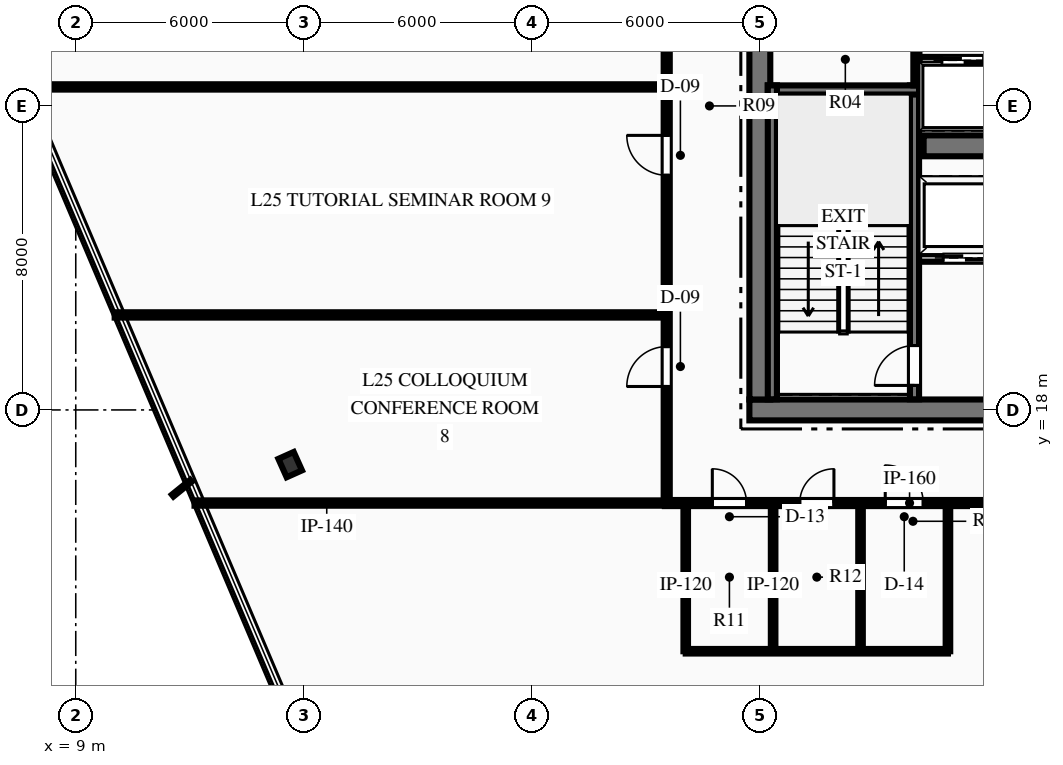
"""IFC4 building model, lengths in metres.
Left out: names, types, materials, properties, quantities, classifications, styles, units other than length and angle.
Written with IfcOpenShell. Run it as: python <this file> out.ifc"""

import sys

from ifc_helpers import new_model, si_unit, direction, frame, frame_2d, origin, origin_2d, place, context, subcontext, project, spatial, rectangle, i_section, extrude, element, fill, save


model = new_model("IFC4")
c1 = context("Model", 3, precision=1e-05, world=origin(), true_north=direction((0.0, 1.0)))
c2 = subcontext(c1, "Body", "Model", "MODEL_VIEW")
j1 = project(units=[si_unit("LENGTHUNIT", "METRE"), si_unit("PLANEANGLEUNIT", "RADIAN")], contexts=[c1])
p1 = place(None, origin())
s1 = spatial("IfcSite", under=j1, at=p1, CompositionType="ELEMENT")
p2 = place(p1, origin())
s2 = spatial("IfcBuilding", under=s1, at=p2, CompositionType="ELEMENT")
p3 = place(p2, frame((0.0, 0.0, 105.45)))
s3 = spatial("IfcBuildingStorey", under=s2, at=p3, CompositionType="ELEMENT", Elevation=105.45)
p4 = place(p3, frame((26.725, 18.0, 0.0), z_axis=(0.0, 0.0, 1.0), x_axis=(1.0, 0.0, 0.0)))
e1 = element("IfcWall", 1, at=p4, inside=s3, PredefinedType="SHEAR", context=c2, shape_type="SweptSolid", body=[
    extrude(rectangle(XDim=18.55, YDim=0.55, at=frame_2d((9.275, 0.0))), origin(), (0.0, 0.0, 1.0), 3.75),
])
p5 = place(p4, frame((7.375, 0.0, 0.0)))
e2 = element("IfcOpeningElement", 2, at=p5, cuts=e1, PredefinedType="OPENING", context=c2, shape_type="SweptSolid", body=[
    extrude(rectangle(XDim=1.1, YDim=2.15, at=frame_2d((0.55, 1.075))), frame((0.0, 0.285, 0.0), z_axis=(0.0, -1.0, 0.0), x_axis=(1.0, 0.0, 0.0)), (0.0, 0.0, 1.0), 0.57),
])
p6 = place(p4, frame((10.075, 0.0, 0.0)))
e3 = element("IfcOpeningElement", 3, at=p6, cuts=e1, PredefinedType="OPENING", context=c2, shape_type="SweptSolid", body=[
    extrude(rectangle(XDim=1.1, YDim=2.15, at=frame_2d((0.55, 1.075))), frame((0.0, 0.285, 0.0), z_axis=(0.0, -1.0, 0.0), x_axis=(1.0, 0.0, 0.0)), (0.0, 0.0, 1.0), 0.57),
])
p7 = place(p3, frame((27.0, 18.275, 0.0), z_axis=(0.0, 0.0, 1.0), x_axis=(0.0, 1.0, 0.0)))
e4 = element("IfcWall", 4, at=p7, inside=s3, PredefinedType="SHEAR", context=c2, shape_type="SweptSolid", body=[
    extrude(rectangle(XDim=15.45, YDim=0.55, at=frame_2d((7.725, 0.0))), origin(), (0.0, 0.0, 1.0), 3.75),
])
p8 = place(p7, frame((9.965, 0.0, 0.0)))
e5 = element("IfcOpeningElement", 5, at=p8, cuts=e4, PredefinedType="OPENING", context=c2, shape_type="SweptSolid", body=[
    extrude(rectangle(XDim=1.4, YDim=2.2, at=frame_2d((0.7, 1.1))), frame((0.0, 0.285, 0.0), z_axis=(0.0, -1.0, 0.0), x_axis=(1.0, 0.0, 0.0)), (0.0, 0.0, 1.0), 0.57),
])
p9 = place(p3, frame((31.31, 24.95, 0.0), z_axis=(0.0, 0.0, 1.0), x_axis=(1.0, 0.0, 0.0)))
e6 = element("IfcWall", 6, at=p9, inside=s3, PredefinedType="SHEAR", context=c2, shape_type="SweptSolid", body=[
    extrude(rectangle(XDim=9.38, YDim=0.55, at=frame_2d((4.69, 0.0))), origin(), (0.0, 0.0, 1.0), 3.75),
])
p10 = place(p3, frame((31.07, 18.28, 0.0), z_axis=(0.0, 0.0, 1.0), x_axis=(0.0, 1.0, 0.0)))
e7 = element("IfcWall", 7, at=p10, inside=s3, PredefinedType="SHEAR", context=c2, shape_type="SweptSolid", body=[
    extrude(rectangle(XDim=8.26, YDim=0.24, at=frame_2d((4.13, 0.0))), origin(), (0.0, 0.0, 1.0), 3.75),
])
p11 = place(p10, frame((0.365, 0.0, 0.0)))
e8 = element("IfcOpeningElement", 8, at=p11, cuts=e7, PredefinedType="OPENING", context=c2, shape_type="SweptSolid", body=[
    extrude(rectangle(XDim=1.05, YDim=2.15, at=frame_2d((0.525, 1.075))), frame((0.0, 0.13, 0.0), z_axis=(0.0, -1.0, 0.0), x_axis=(1.0, 0.0, 0.0)), (0.0, 0.0, 1.0), 0.26),
])
p12 = place(p3, frame((27.21, 26.42, 0.0), z_axis=(0.0, 0.0, 1.0), x_axis=(1.0, 0.0, 0.0)))
e9 = element("IfcWall", 9, at=p12, inside=s3, PredefinedType="SHEAR", context=c2, shape_type="SweptSolid", body=[
    extrude(rectangle(XDim=3.98, YDim=0.24, at=frame_2d((1.99, 0.0))), origin(), (0.0, 0.0, 1.0), 3.75),
])
p13 = place(p3, frame((27.33, 18.28, 0.0), z_axis=(0.0, 0.0, 1.0), x_axis=(0.0, 1.0, 0.0)))
e10 = element("IfcWall", 10, at=p13, inside=s3, PredefinedType="SHEAR", context=c2, shape_type="SweptSolid", body=[
    extrude(rectangle(XDim=8.26, YDim=0.24, at=frame_2d((4.13, 0.0))), origin(), (0.0, 0.0, 1.0), 3.75),
])
p14 = place(p3, frame((14.643, 16.561, 0.0), z_axis=(0.0, 0.0, 1.0), x_axis=(0.912477494148, 0.409126902895, 0.0)))
e11 = element("IfcColumn", 11, at=p14, inside=s3, PredefinedType="COLUMN", context=c2, shape_type="SweptSolid", body=[
    extrude(i_section(OverallWidth=0.442, OverallDepth=0.531, WebThickness=0.066, FlangeThickness=0.106, at=origin_2d()), origin(), (0.0, 0.0, 1.0), 3.75),
])
p15 = place(p3, frame((31.19, 22.0, 0.0), z_axis=(0.0, 0.0, 1.0), x_axis=(1.0, 0.0, 0.0)))
e12 = element("IfcWall", 12, at=p15, inside=s3, PredefinedType="PARTITIONING", context=c2, shape_type="SweptSolid", body=[
    extrude(rectangle(XDim=4.69, YDim=0.2, at=frame_2d((2.345, 0.0))), origin(), (0.0, 0.0, 1.0), 3.45),
])
p16 = place(p15, frame((2.91, 0.0, 0.0)))
e13 = element("IfcOpeningElement", 13, at=p16, cuts=e12, PredefinedType="OPENING", context=c2, shape_type="SweptSolid", body=[
    extrude(rectangle(XDim=0.9, YDim=2.15, at=frame_2d((0.45, 1.075))), frame((0.0, 0.11, 0.0), z_axis=(0.0, -1.0, 0.0), x_axis=(1.0, 0.0, 0.0)), (0.0, 0.0, 1.0), 0.22),
])
p17 = place(p15, frame((0.635, 0.0, 0.0)))
e14 = element("IfcOpeningElement", 14, at=p17, cuts=e12, PredefinedType="OPENING", context=c2, shape_type="SweptSolid", body=[
    extrude(rectangle(XDim=1.1, YDim=2.15, at=frame_2d((0.55, 1.075))), frame((0.0, 0.11, 0.0), z_axis=(0.0, -1.0, 0.0), x_axis=(1.0, 0.0, 0.0)), (0.0, 0.0, 1.0), 0.22),
])
p18 = place(p3, frame((31.12, 26.54, 0.0), z_axis=(0.0, 0.0, 1.0), x_axis=(0.0, 1.0, 0.0)))
e15 = element("IfcWall", 15, at=p18, inside=s3, PredefinedType="PARTITIONING", context=c2, shape_type="SweptSolid", body=[
    extrude(rectangle(XDim=1.51, YDim=0.16, at=frame_2d((0.755, 0.0))), origin(), (0.0, 0.0, 1.0), 3.45),
])
p19 = place(p3, frame((31.2, 27.2, 0.0), z_axis=(0.0, 0.0, 1.0), x_axis=(1.0, 0.0, 0.0)))
e16 = element("IfcWall", 16, at=p19, inside=s3, PredefinedType="PARTITIONING", context=c2, shape_type="SweptSolid", body=[
    extrude(rectangle(XDim=9.6, YDim=0.18, at=frame_2d((4.8, 0.0))), origin(), (0.0, 0.0, 1.0), 3.45),
])
p20 = place(p19, frame((0.59, 0.0, 0.0)))
e17 = element("IfcOpeningElement", 17, at=p20, cuts=e16, PredefinedType="OPENING", context=c2, shape_type="SweptSolid", body=[
    extrude(rectangle(XDim=1.1, YDim=2.15, at=frame_2d((0.55, 1.075))), frame((0.0, 0.1, 0.0), z_axis=(0.0, -1.0, 0.0), x_axis=(1.0, 0.0, 0.0)), (0.0, 0.0, 1.0), 0.2),
])
p21 = place(p19, frame((2.99, 0.0, 0.0)))
e18 = element("IfcOpeningElement", 18, at=p21, cuts=e16, PredefinedType="OPENING", context=c2, shape_type="SweptSolid", body=[
    extrude(rectangle(XDim=1.1, YDim=2.15, at=frame_2d((0.55, 1.075))), frame((0.0, 0.1, 0.0), z_axis=(0.0, -1.0, 0.0), x_axis=(1.0, 0.0, 0.0)), (0.0, 0.0, 1.0), 0.2),
])
p22 = place(p19, frame((5.51, 0.0, 0.0)))
e19 = element("IfcOpeningElement", 19, at=p22, cuts=e16, PredefinedType="OPENING", context=c2, shape_type="SweptSolid", body=[
    extrude(rectangle(XDim=1.1, YDim=2.15, at=frame_2d((0.55, 1.075))), frame((0.0, 0.1, 0.0), z_axis=(0.0, -1.0, 0.0), x_axis=(1.0, 0.0, 0.0)), (0.0, 0.0, 1.0), 0.2),
])
p23 = place(p19, frame((7.91, 0.0, 0.0)))
e20 = element("IfcOpeningElement", 20, at=p23, cuts=e16, PredefinedType="OPENING", context=c2, shape_type="SweptSolid", body=[
    extrude(rectangle(XDim=1.1, YDim=2.15, at=frame_2d((0.55, 1.075))), frame((0.0, 0.1, 0.0), z_axis=(0.0, -1.0, 0.0), x_axis=(1.0, 0.0, 0.0)), (0.0, 0.0, 1.0), 0.2),
])
p24 = place(p3, frame((24.5, 15.55, 0.0), z_axis=(0.0, 0.0, 1.0), x_axis=(1.0, 0.0, 0.0)))
e21 = element("IfcWall", 21, at=p24, inside=s3, PredefinedType="PARTITIONING", context=c2, shape_type="SweptSolid", body=[
    extrude(rectangle(XDim=23.0, YDim=0.16, at=frame_2d((11.5, 0.0))), origin(), (0.0, 0.0, 1.0), 3.45),
])
p25 = place(p24, frame((1.25, 0.0, 0.0)))
e22 = element("IfcOpeningElement", 22, at=p25, cuts=e21, PredefinedType="OPENING", context=c2, shape_type="SweptSolid", body=[
    extrude(rectangle(XDim=0.9, YDim=2.15, at=frame_2d((0.45, 1.075))), frame((0.0, 0.09, 0.0), z_axis=(0.0, -1.0, 0.0), x_axis=(1.0, 0.0, 0.0)), (0.0, 0.0, 1.0), 0.18),
])
p26 = place(p24, frame((3.55, 0.0, 0.0)))
e23 = element("IfcOpeningElement", 23, at=p26, cuts=e21, PredefinedType="OPENING", context=c2, shape_type="SweptSolid", body=[
    extrude(rectangle(XDim=0.9, YDim=2.15, at=frame_2d((0.45, 1.075))), frame((0.0, 0.09, 0.0), z_axis=(0.0, -1.0, 0.0), x_axis=(1.0, 0.0, 0.0)), (0.0, 0.0, 1.0), 0.18),
])
p27 = place(p24, frame((5.8, 0.0, 0.0)))
e24 = element("IfcOpeningElement", 24, at=p27, cuts=e21, PredefinedType="OPENING", context=c2, shape_type="SweptSolid", body=[
    extrude(rectangle(XDim=1.0, YDim=2.15, at=frame_2d((0.5, 1.075))), frame((0.0, 0.09, 0.0), z_axis=(0.0, -1.0, 0.0), x_axis=(1.0, 0.0, 0.0)), (0.0, 0.0, 1.0), 0.18),
])
p28 = place(p24, frame((9.875, 0.0, 0.0)))
e25 = element("IfcOpeningElement", 25, at=p28, cuts=e21, PredefinedType="OPENING", context=c2, shape_type="SweptSolid", body=[
    extrude(rectangle(XDim=1.05, YDim=2.15, at=frame_2d((0.525, 1.075))), frame((0.0, 0.09, 0.0), z_axis=(0.0, -1.0, 0.0), x_axis=(1.0, 0.0, 0.0)), (0.0, 0.0, 1.0), 0.18),
])
p29 = place(p24, frame((18.169, 0.0, 0.0)))
e26 = element("IfcOpeningElement", 26, at=p29, cuts=e21, PredefinedType="OPENING", context=c2, shape_type="SweptSolid", body=[
    extrude(rectangle(XDim=1.05, YDim=2.15, at=frame_2d((0.525, 1.075))), frame((0.0, 0.09, 0.0), z_axis=(0.0, -1.0, 0.0), x_axis=(1.0, 0.0, 0.0)), (0.0, 0.0, 1.0), 0.18),
])
p30 = place(p3, frame((24.55, 15.55, 0.0), z_axis=(0.0, 0.0, 1.0), x_axis=(0.0, 1.0, 0.0)))
e27 = element("IfcWall", 27, at=p30, inside=s3, PredefinedType="PARTITIONING", context=c2, shape_type="SweptSolid", body=[
    extrude(rectangle(XDim=20.9, YDim=0.16, at=frame_2d((10.45, 0.0))), origin(), (0.0, 0.0, 1.0), 3.45),
])
p31 = place(p30, frame((3.067, 0.0, 0.0)))
e28 = element("IfcOpeningElement", 28, at=p31, cuts=e27, PredefinedType="OPENING", context=c2, shape_type="SweptSolid", body=[
    extrude(rectangle(XDim=1.05, YDim=2.15, at=frame_2d((0.525, 1.075))), frame((0.0, 0.09, 0.0), z_axis=(0.0, -1.0, 0.0), x_axis=(1.0, 0.0, 0.0)), (0.0, 0.0, 1.0), 0.18),
])
p32 = place(p30, frame((8.625, 0.0, 0.0)))
e29 = element("IfcOpeningElement", 29, at=p32, cuts=e27, PredefinedType="OPENING", context=c2, shape_type="SweptSolid", body=[
    extrude(rectangle(XDim=1.05, YDim=2.15, at=frame_2d((0.525, 1.075))), frame((0.0, 0.09, 0.0), z_axis=(0.0, -1.0, 0.0), x_axis=(1.0, 0.0, 0.0)), (0.0, 0.0, 1.0), 0.18),
])
p33 = place(p30, frame((12.245, 0.0, 0.0)))
e30 = element("IfcOpeningElement", 30, at=p33, cuts=e27, PredefinedType="OPENING", context=c2, shape_type="SweptSolid", body=[
    extrude(rectangle(XDim=1.05, YDim=2.15, at=frame_2d((0.525, 1.075))), frame((0.0, 0.09, 0.0), z_axis=(0.0, -1.0, 0.0), x_axis=(1.0, 0.0, 0.0)), (0.0, 0.0, 1.0), 0.18),
])
p34 = place(p30, frame((16.783, 0.0, 0.0)))
e31 = element("IfcOpeningElement", 31, at=p34, cuts=e27, PredefinedType="OPENING", context=c2, shape_type="SweptSolid", body=[
    extrude(rectangle(XDim=1.05, YDim=2.15, at=frame_2d((0.525, 1.075))), frame((0.0, 0.09, 0.0), z_axis=(0.0, -1.0, 0.0), x_axis=(1.0, 0.0, 0.0)), (0.0, 0.0, 1.0), 0.18),
])
for number, where, z_axis, x_axis in (
    (32, (25.05, 11.65, 0.0), (0.0, 0.0, 1.0), (0.0, 1.0, 0.0)),
    (33, (27.35, 11.65, 0.0), (0.0, 0.0, 1.0), (0.0, 1.0, 0.0)),
    (34, (29.65, 11.65, 0.0), (0.0, 0.0, 1.0), (0.0, 1.0, 0.0)),
):
    element("IfcWall", number, at=place(p3, frame(where, z_axis=z_axis, x_axis=x_axis)), inside=s3, PredefinedType="PARTITIONING", context=c2, shape_type="SweptSolid", body=[
        extrude(rectangle(XDim=3.9, YDim=0.12, at=frame_2d((1.95, 0.0))), origin(), (0.0, 0.0, 1.0), 3.45),
    ])
p35 = place(p3, frame((31.95, 11.65, 0.0), z_axis=(0.0, 0.0, 1.0), x_axis=(0.0, 1.0, 0.0)))
e35 = element("IfcWall", 35, at=p35, inside=s3, PredefinedType="PARTITIONING", context=c2, shape_type="SweptSolid", body=[
    extrude(rectangle(XDim=3.9, YDim=0.12, at=frame_2d((1.95, 0.0))), origin(), (0.0, 0.0, 1.0), 2.749),
])
p36 = place(p3, frame((25.05, 11.65, 0.0), z_axis=(0.0, 0.0, 1.0), x_axis=(1.0, 0.0, 0.0)))
e36 = element("IfcWall", 36, at=p36, inside=s3, PredefinedType="PARTITIONING", context=c2, shape_type="SweptSolid", body=[
    extrude(rectangle(XDim=6.9, YDim=0.12, at=frame_2d((3.45, 0.0))), origin(), (0.0, 0.0, 1.0), 3.45),
])
p37 = place(p3, frame((12.125, 15.55, 0.0), z_axis=(0.0, 0.0, 1.0), x_axis=(1.0, 0.0, 0.0)))
e37 = element("IfcWall", 37, at=p37, inside=s3, PredefinedType="PARTITIONING", context=c2, shape_type="SweptSolid", body=[
    extrude(rectangle(XDim=12.425, YDim=0.14, at=frame_2d((6.212, 0.0))), origin(), (0.0, 0.0, 1.0), 3.45),
])
p38 = place(p3, frame((10.024, 20.5, 0.0), z_axis=(0.0, 0.0, 1.0), x_axis=(1.0, 0.0, 0.0)))
e38 = element("IfcWall", 38, at=p38, inside=s3, PredefinedType="PARTITIONING", context=c2, shape_type="SweptSolid", body=[
    extrude(rectangle(XDim=14.526, YDim=0.14, at=frame_2d((7.263, 0.0))), origin(), (0.0, 0.0, 1.0), 3.45),
])
p39 = place(p3, frame((7.477, 26.5, 0.0), z_axis=(0.0, 0.0, 1.0), x_axis=(1.0, 0.0, 0.0)))
e39 = element("IfcWall", 39, at=p39, inside=s3, PredefinedType="PARTITIONING", context=c2, shape_type="SweptSolid", body=[
    extrude(rectangle(XDim=17.073, YDim=0.14, at=frame_2d((8.536, 0.0))), origin(), (0.0, 0.0, 1.0), 3.45),
])
p40 = place(p11, origin())
e40 = element("IfcDoor", 40, at=p40, inside=s3, OperationType="SINGLE_SWING_LEFT", PredefinedType="DOOR", context=c2, shape_type="SweptSolid", body=[
    extrude(rectangle(XDim=1.05, YDim=2.15, at=frame_2d((0.525, 1.075))), frame((0.0, 0.025, 0.0), z_axis=(0.0, -1.0, 0.0), x_axis=(1.0, 0.0, 0.0)), (0.0, 0.0, 1.0), 0.05),
])
fill(e8, e40)
p41 = place(p25, origin())
e41 = element("IfcDoor", 41, at=p41, inside=s3, OperationType="SINGLE_SWING_LEFT", PredefinedType="DOOR", context=c2, shape_type="SweptSolid", body=[
    extrude(rectangle(XDim=0.9, YDim=2.15, at=frame_2d((0.45, 1.075))), frame((0.0, 0.025, 0.0), z_axis=(0.0, -1.0, 0.0), x_axis=(1.0, 0.0, 0.0)), (0.0, 0.0, 1.0), 0.05),
])
fill(e22, e41)
p42 = place(p26, origin())
e42 = element("IfcDoor", 42, at=p42, inside=s3, OperationType="SINGLE_SWING_RIGHT", PredefinedType="DOOR", context=c2, shape_type="SweptSolid", body=[
    extrude(rectangle(XDim=0.9, YDim=2.15, at=frame_2d((0.45, 1.075))), frame((0.0, 0.025, 0.0), z_axis=(0.0, -1.0, 0.0), x_axis=(1.0, 0.0, 0.0)), (0.0, 0.0, 1.0), 0.05),
])
fill(e23, e42)
p43 = place(p27, origin())
e43 = element("IfcDoor", 43, at=p43, inside=s3, OperationType="SINGLE_SWING_LEFT", PredefinedType="DOOR", context=c2, shape_type="SweptSolid", body=[
    extrude(rectangle(XDim=1.0, YDim=2.15, at=frame_2d((0.5, 1.075))), frame((0.0, 0.025, 0.0), z_axis=(0.0, -1.0, 0.0), x_axis=(1.0, 0.0, 0.0)), (0.0, 0.0, 1.0), 0.05),
])
fill(e24, e43)
p44 = place(p31, origin())
e44 = element("IfcDoor", 44, at=p44, inside=s3, OperationType="SINGLE_SWING_LEFT", PredefinedType="DOOR", context=c2, shape_type="SweptSolid", body=[
    extrude(rectangle(XDim=1.05, YDim=2.15, at=frame_2d((0.525, 1.075))), frame((0.0, 0.025, 0.0), z_axis=(0.0, -1.0, 0.0), x_axis=(1.0, 0.0, 0.0)), (0.0, 0.0, 1.0), 0.05),
])
fill(e28, e44)
p45 = place(p32, origin())
e45 = element("IfcDoor", 45, at=p45, inside=s3, OperationType="SINGLE_SWING_RIGHT", PredefinedType="DOOR", context=c2, shape_type="SweptSolid", body=[
    extrude(rectangle(XDim=1.05, YDim=2.15, at=frame_2d((0.525, 1.075))), frame((0.0, 0.025, 0.0), z_axis=(0.0, -1.0, 0.0), x_axis=(1.0, 0.0, 0.0)), (0.0, 0.0, 1.0), 0.05),
])
fill(e29, e45)
p46 = place(p20, origin())
e46 = element("IfcDoor", 46, at=p46, inside=s3, OperationType="SLIDING_TO_LEFT", PredefinedType="DOOR", context=c2, shape_type="SweptSolid", body=[
    extrude(rectangle(XDim=1.1, YDim=2.15, at=frame_2d((0.55, 1.075))), frame((0.0, 0.025, 0.0), z_axis=(0.0, -1.0, 0.0), x_axis=(1.0, 0.0, 0.0)), (0.0, 0.0, 1.0), 0.05),
])
fill(e17, e46)
p47 = place(p17, origin())
e47 = element("IfcDoor", 47, at=p47, inside=s3, OperationType="SLIDING_TO_LEFT", PredefinedType="DOOR", context=c2, shape_type="SweptSolid", body=[
    extrude(rectangle(XDim=1.1, YDim=2.15, at=frame_2d((0.55, 1.075))), frame((0.0, 0.025, 0.0), z_axis=(0.0, -1.0, 0.0), x_axis=(1.0, 0.0, 0.0)), (0.0, 0.0, 1.0), 0.05),
])
fill(e14, e47)
save(model, sys.argv[1])
